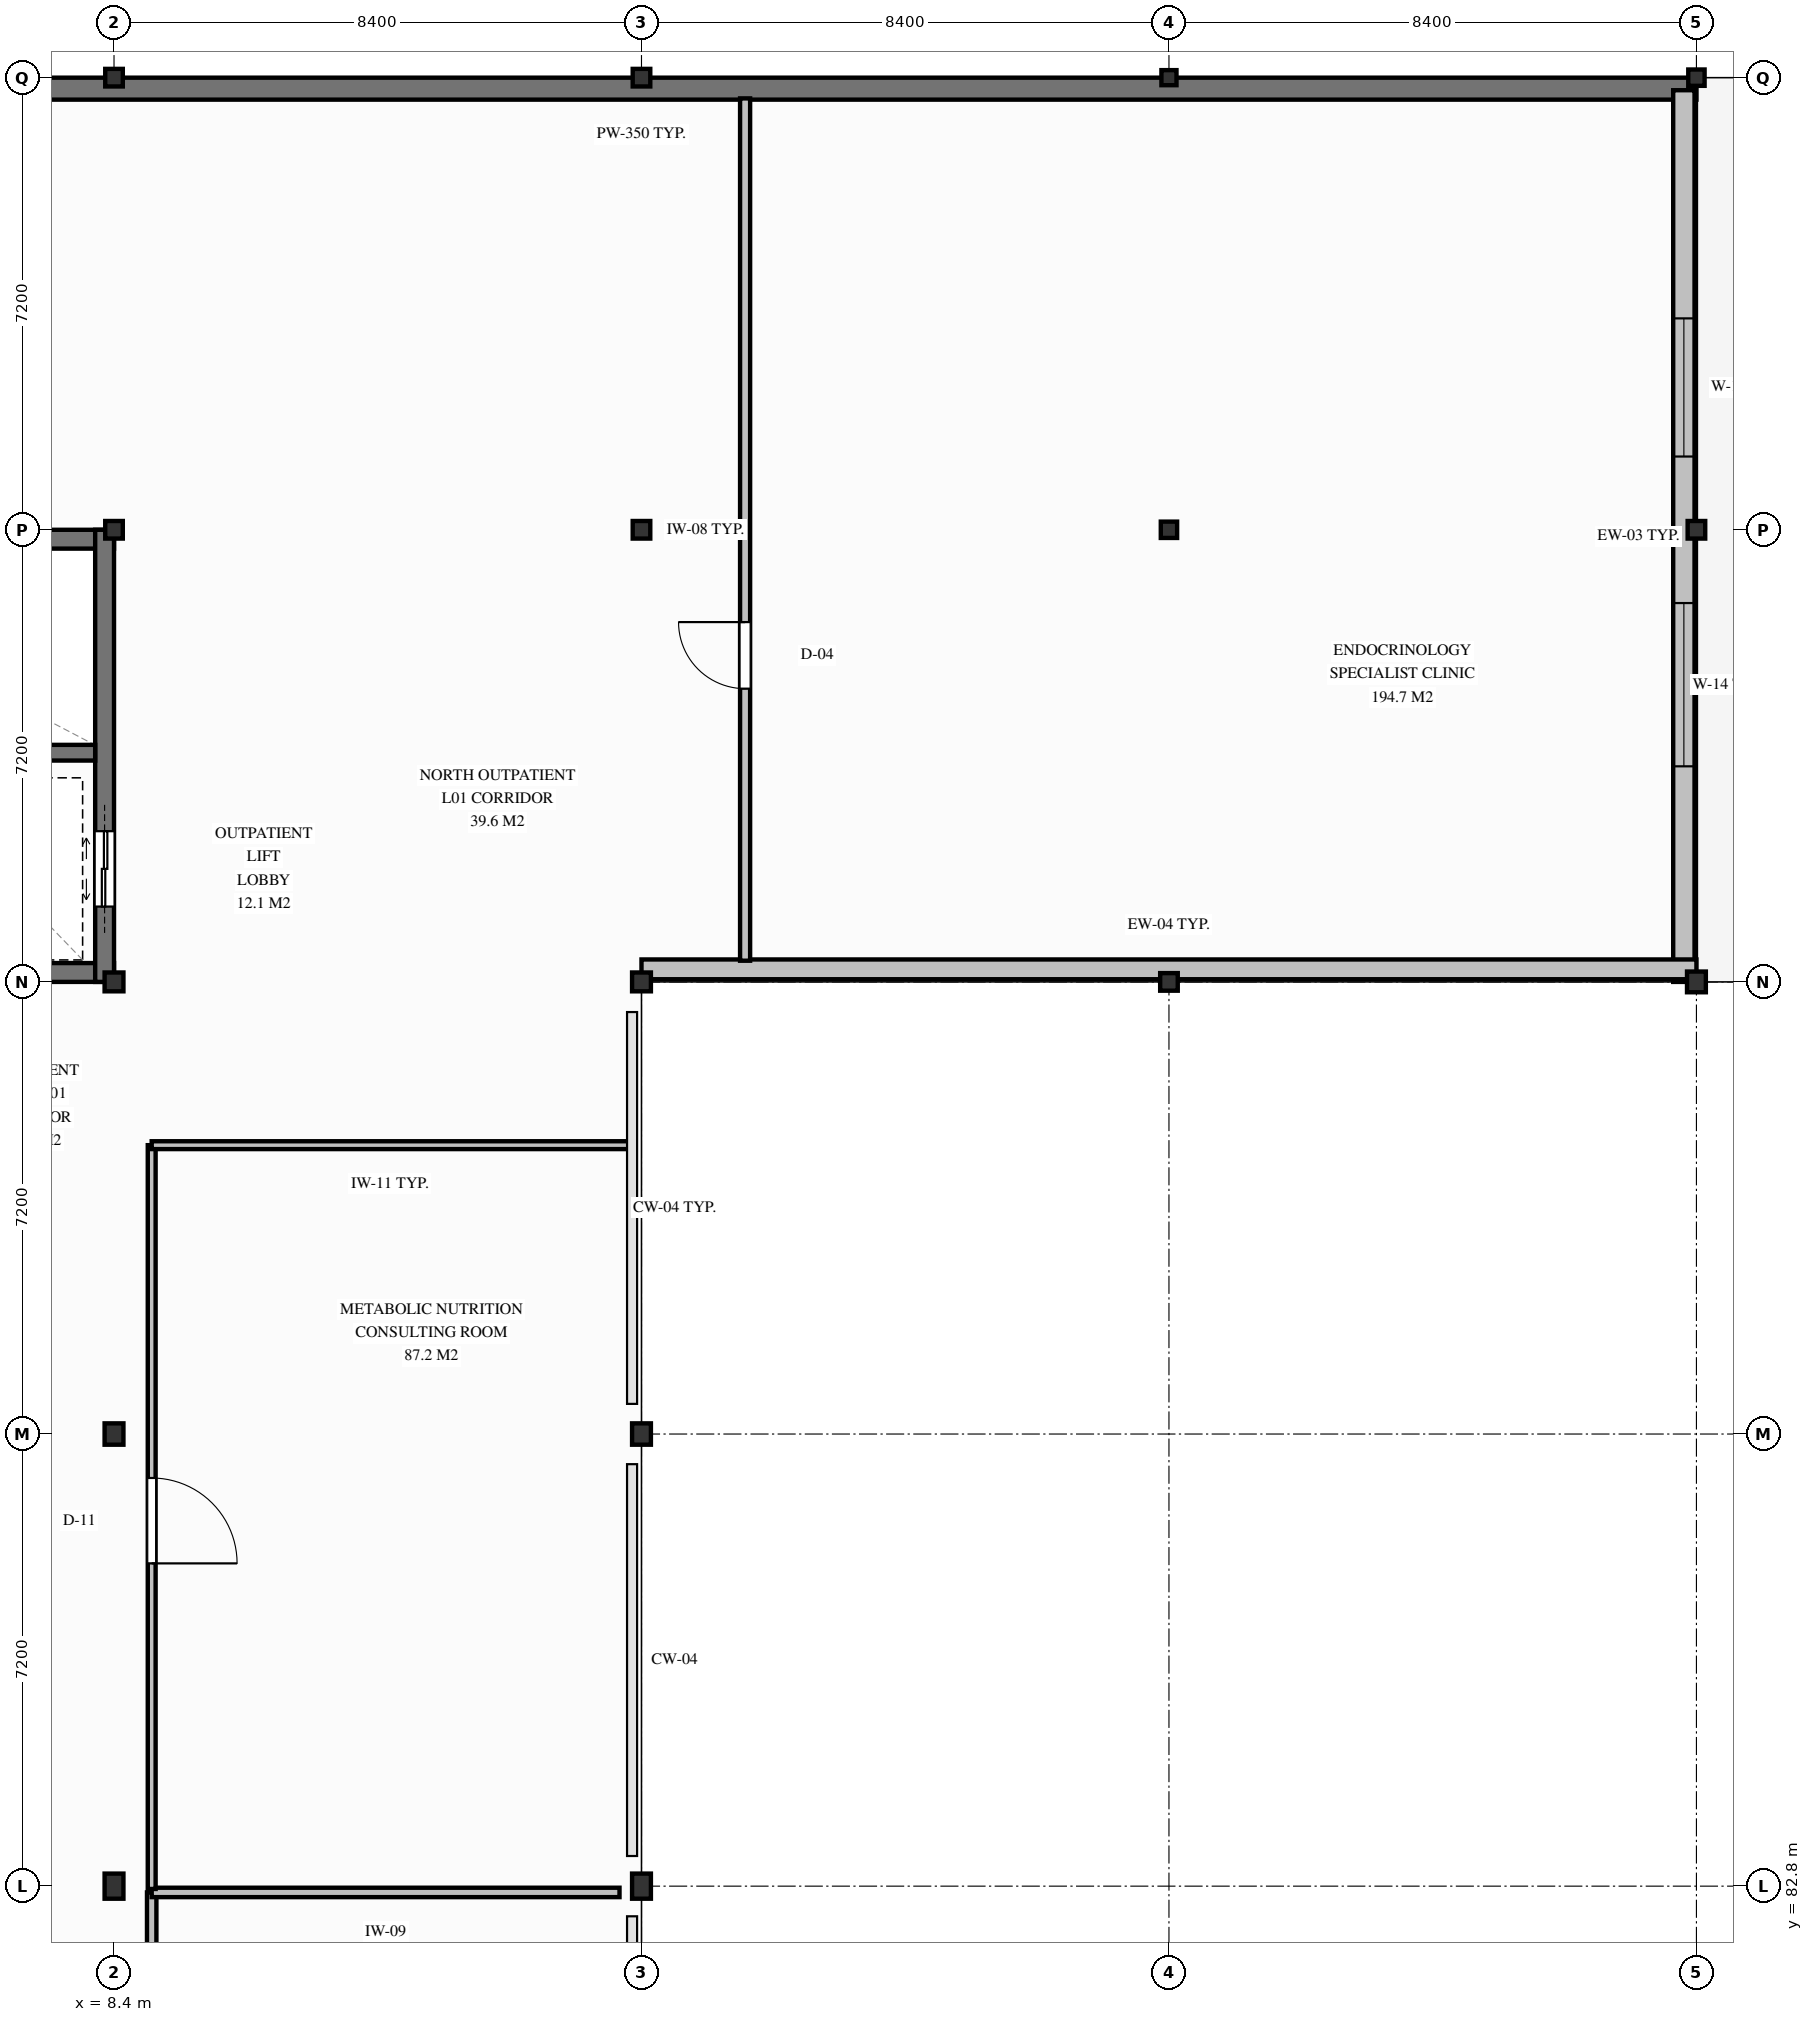
"""IFC4 building model, lengths in metres.
Left out: names, types, materials, properties, quantities, classifications, styles, units other than length and angle.
Written with IfcOpenShell. Run it as: python <this file> out.ifc"""

import sys

from ifc_helpers import new_model, si_unit, direction, frame, frame_2d, origin, origin_2d, place, context, subcontext, project, spatial, rectangle, i_section, extrude, element, fill, save


model = new_model("IFC4")
c1 = context("Model", 3, precision=1e-05, world=origin(), true_north=direction((0.0, 1.0)))
c2 = subcontext(c1, "Body", "Model", "MODEL_VIEW")
j1 = project(units=[si_unit("LENGTHUNIT", "METRE"), si_unit("PLANEANGLEUNIT", "RADIAN")], contexts=[c1])
p1 = place(None, origin())
s1 = spatial("IfcSite", under=j1, at=p1, CompositionType="ELEMENT")
p2 = place(p1, origin())
s2 = spatial("IfcBuilding", under=s1, at=p2, CompositionType="ELEMENT")
p3 = place(p2, frame((0.0, 0.0, 4.5)))
s3 = spatial("IfcBuildingStorey", under=s2, at=p3, CompositionType="ELEMENT", Elevation=4.5)
p4 = place(p3, frame((0.0, 104.25, 0.0), z_axis=(0.0, 0.0, 1.0), x_axis=(1.0, 0.0, 0.0)))
e1 = element("IfcWall", 1, at=p4, inside=s3, PredefinedType="SHEAR", context=c2, shape_type="SweptSolid", body=[
    extrude(rectangle(XDim=8.4, YDim=0.3, at=frame_2d((4.2, 0.0))), origin(), (0.0, 0.0, 1.0), 4.5),
])
p5 = place(p3, frame((0.0, 97.35, 0.0), z_axis=(0.0, 0.0, 1.0), x_axis=(1.0, 0.0, 0.0)))
e2 = element("IfcWall", 2, at=p5, inside=s3, PredefinedType="SHEAR", context=c2, shape_type="SweptSolid", body=[
    extrude(rectangle(XDim=8.4, YDim=0.3, at=frame_2d((4.2, 0.0))), origin(), (0.0, 0.0, 1.0), 4.5),
])
p6 = place(p5, frame((3.0, 0.0, 0.0)))
e3 = element("IfcOpeningElement", 3, at=p6, cuts=e2, PredefinedType="OPENING", context=c2, shape_type="SweptSolid", body=[
    extrude(rectangle(XDim=1.1, YDim=2.15, at=frame_2d((0.55, 1.075))), frame((0.0, 0.16, 0.0), z_axis=(0.0, -1.0, 0.0), x_axis=(1.0, 0.0, 0.0)), (0.0, 0.0, 1.0), 0.32),
])
p7 = place(p3, frame((8.25, 97.2, 0.0), z_axis=(0.0, 0.0, 1.0), x_axis=(0.0, 1.0, 0.0)))
e4 = element("IfcWall", 4, at=p7, inside=s3, PredefinedType="SHEAR", context=c2, shape_type="SweptSolid", body=[
    extrude(rectangle(XDim=7.2, YDim=0.3, at=frame_2d((3.6, 0.0))), origin(), (0.0, 0.0, 1.0), 4.5),
])
p8 = place(p7, frame((1.2, 0.0, 0.0)))
e5 = element("IfcOpeningElement", 5, at=p8, cuts=e4, PredefinedType="OPENING", context=c2, shape_type="SweptSolid", body=[
    extrude(rectangle(XDim=1.2, YDim=2.15, at=frame_2d((0.6, 1.075))), frame((0.0, 0.16, 0.0), z_axis=(0.0, -1.0, 0.0), x_axis=(1.0, 0.0, 0.0)), (0.0, 0.0, 1.0), 0.32),
])
p9 = place(p3, frame((0.3, 100.85, 0.0), z_axis=(0.0, 0.0, 1.0), x_axis=(1.0, 0.0, 0.0)))
e6 = element("IfcWall", 6, at=p9, inside=s3, PredefinedType="SHEAR", context=c2, shape_type="SweptSolid", body=[
    extrude(rectangle(XDim=7.8, YDim=0.25, at=frame_2d((3.9, 0.0))), origin(), (0.0, 0.0, 1.0), 4.5),
])
p10 = place(p9, frame((0.4, 0.0, 0.0)))
e7 = element("IfcOpeningElement", 7, at=p10, cuts=e6, PredefinedType="OPENING", context=c2, shape_type="SweptSolid", body=[
    extrude(rectangle(XDim=1.1, YDim=2.15, at=frame_2d((0.55, 1.075))), frame((0.0, 0.135, 0.0), z_axis=(0.0, -1.0, 0.0), x_axis=(1.0, 0.0, 0.0)), (0.0, 0.0, 1.0), 0.27),
])
p11 = place(p3, frame((0.0, 111.425, 0.0), z_axis=(0.0, 0.0, 1.0), x_axis=(1.0, 0.0, 0.0)))
e8 = element("IfcWall", 8, at=p11, inside=s3, PredefinedType="SHEAR", context=c2, shape_type="SweptSolid", body=[
    extrude(rectangle(XDim=33.6, YDim=0.35, at=frame_2d((16.8, 0.0))), origin(), (0.0, 0.0, 1.0), 4.5),
])
p12 = place(p3, frame((8.4, 82.8, 0.0), z_axis=(0.0, 0.0, 1.0), x_axis=(1.0, 0.0, 0.0)))
e9 = element("IfcColumn", 9, at=p12, inside=s3, PredefinedType="COLUMN", context=c2, shape_type="SweptSolid", body=[
    extrude(i_section(OverallWidth=0.3, OverallDepth=0.4, WebThickness=0.013, FlangeThickness=0.024, FilletRadius=0.027, at=origin_2d()), origin(), (0.0, 0.0, 1.0), 4.5),
])
p13 = place(p3, frame((8.4, 90.0, 0.0), z_axis=(0.0, 0.0, 1.0), x_axis=(1.0, 0.0, 0.0)))
e10 = element("IfcColumn", 10, at=p13, inside=s3, PredefinedType="COLUMN", context=c2, shape_type="SweptSolid", body=[
    extrude(i_section(OverallWidth=0.3, OverallDepth=0.34, WebThickness=0.012, FlangeThickness=0.021, FilletRadius=0.027, at=origin_2d()), origin(), (0.0, 0.0, 1.0), 4.5),
])
p14 = place(p3, frame((8.4, 97.2, 0.0), z_axis=(0.0, 0.0, 1.0), x_axis=(1.0, 0.0, 0.0)))
e11 = element("IfcColumn", 11, at=p14, inside=s3, PredefinedType="COLUMN", context=c2, shape_type="SweptSolid", body=[
    extrude(i_section(OverallWidth=0.3, OverallDepth=0.3, WebThickness=0.011, FlangeThickness=0.019, FilletRadius=0.027, at=origin_2d()), origin(), (0.0, 0.0, 1.0), 4.5),
])
for number, where, z_axis, x_axis in (
    (12, (8.4, 104.4, 0.0), (0.0, 0.0, 1.0), (1.0, 0.0, 0.0)),
    (13, (8.4, 111.6, 0.0), (0.0, 0.0, 1.0), (1.0, 0.0, 0.0)),
):
    element("IfcColumn", number, at=place(p3, frame(where, z_axis=z_axis, x_axis=x_axis)), inside=s3, PredefinedType="COLUMN", context=c2, shape_type="SweptSolid", body=[
        extrude(i_section(OverallWidth=0.28, OverallDepth=0.28, WebThickness=0.01, FlangeThickness=0.018, FilletRadius=0.024, at=origin_2d()), origin(), (0.0, 0.0, 1.0), 4.5),
    ])
p15 = place(p3, frame((16.8, 82.8, 0.0), z_axis=(0.0, 0.0, 1.0), x_axis=(1.0, 0.0, 0.0)))
e14 = element("IfcColumn", 14, at=p15, inside=s3, PredefinedType="COLUMN", context=c2, shape_type="SweptSolid", body=[
    extrude(i_section(OverallWidth=0.3, OverallDepth=0.4, WebThickness=0.013, FlangeThickness=0.024, FilletRadius=0.027, at=origin_2d()), origin(), (0.0, 0.0, 1.0), 4.5),
])
p16 = place(p3, frame((16.8, 90.0, 0.0), z_axis=(0.0, 0.0, 1.0), x_axis=(1.0, 0.0, 0.0)))
e15 = element("IfcColumn", 15, at=p16, inside=s3, PredefinedType="COLUMN", context=c2, shape_type="SweptSolid", body=[
    extrude(i_section(OverallWidth=0.3, OverallDepth=0.34, WebThickness=0.012, FlangeThickness=0.021, FilletRadius=0.027, at=origin_2d()), origin(), (0.0, 0.0, 1.0), 4.5),
])
p17 = place(p3, frame((16.8, 97.2, 0.0), z_axis=(0.0, 0.0, 1.0), x_axis=(1.0, 0.0, 0.0)))
e16 = element("IfcColumn", 16, at=p17, inside=s3, PredefinedType="COLUMN", context=c2, shape_type="SweptSolid", body=[
    extrude(i_section(OverallWidth=0.3, OverallDepth=0.3, WebThickness=0.011, FlangeThickness=0.019, FilletRadius=0.027, at=origin_2d()), origin(), (0.0, 0.0, 1.0), 4.5),
])
for number, where, z_axis, x_axis in (
    (17, (16.8, 104.4, 0.0), (0.0, 0.0, 1.0), (1.0, 0.0, 0.0)),
    (18, (16.8, 111.6, 0.0), (0.0, 0.0, 1.0), (1.0, 0.0, 0.0)),
    (19, (25.2, 97.2, 0.0), (0.0, 0.0, 1.0), (1.0, 0.0, 0.0)),
):
    element("IfcColumn", number, at=place(p3, frame(where, z_axis=z_axis, x_axis=x_axis)), inside=s3, PredefinedType="COLUMN", context=c2, shape_type="SweptSolid", body=[
        extrude(i_section(OverallWidth=0.28, OverallDepth=0.28, WebThickness=0.01, FlangeThickness=0.018, FilletRadius=0.024, at=origin_2d()), origin(), (0.0, 0.0, 1.0), 4.5),
    ])
p18 = place(p3, frame((25.2, 104.4, 0.0), z_axis=(0.0, 0.0, 1.0), x_axis=(1.0, 0.0, 0.0)))
e20 = element("IfcColumn", 20, at=p18, inside=s3, PredefinedType="COLUMN", context=c2, shape_type="SweptSolid", body=[
    extrude(i_section(OverallWidth=0.26, OverallDepth=0.26, WebThickness=0.01, FlangeThickness=0.018, FilletRadius=0.024, at=origin_2d()), origin(), (0.0, 0.0, 1.0), 4.5),
])
p19 = place(p3, frame((25.2, 111.6, 0.0), z_axis=(0.0, 0.0, 1.0), x_axis=(1.0, 0.0, 0.0)))
e21 = element("IfcColumn", 21, at=p19, inside=s3, PredefinedType="COLUMN", context=c2, shape_type="SweptSolid", body=[
    extrude(i_section(OverallWidth=0.24, OverallDepth=0.24, WebThickness=0.01, FlangeThickness=0.017, FilletRadius=0.021, at=origin_2d()), origin(), (0.0, 0.0, 1.0), 4.5),
])
p20 = place(p3, frame((33.6, 97.2, 0.0), z_axis=(0.0, 0.0, 1.0), x_axis=(1.0, 0.0, 0.0)))
e22 = element("IfcColumn", 22, at=p20, inside=s3, PredefinedType="COLUMN", context=c2, shape_type="SweptSolid", body=[
    extrude(i_section(OverallWidth=0.3, OverallDepth=0.33, WebThickness=0.01, FlangeThickness=0.017, FilletRadius=0.027, at=origin_2d()), origin(), (0.0, 0.0, 1.0), 4.5),
])
p21 = place(p3, frame((33.6, 104.4, 0.0), z_axis=(0.0, 0.0, 1.0), x_axis=(1.0, 0.0, 0.0)))
e23 = element("IfcColumn", 23, at=p21, inside=s3, PredefinedType="COLUMN", context=c2, shape_type="SweptSolid", body=[
    extrude(i_section(OverallWidth=0.28, OverallDepth=0.28, WebThickness=0.01, FlangeThickness=0.018, FilletRadius=0.024, at=origin_2d()), origin(), (0.0, 0.0, 1.0), 4.5),
])
p22 = place(p3, frame((33.6, 111.6, 0.0), z_axis=(0.0, 0.0, 1.0), x_axis=(1.0, 0.0, 0.0)))
e24 = element("IfcColumn", 24, at=p22, inside=s3, PredefinedType="COLUMN", context=c2, shape_type="SweptSolid", body=[
    extrude(i_section(OverallWidth=0.26, OverallDepth=0.26, WebThickness=0.01, FlangeThickness=0.018, FilletRadius=0.024, at=origin_2d()), origin(), (0.0, 0.0, 1.0), 4.5),
])
p23 = place(p3, frame((33.4, 111.4, 0.0), z_axis=(0.0, 0.0, 1.0), x_axis=(0.0, -1.0, 0.0)))
e25 = element("IfcWall", 25, at=p23, inside=s3, PredefinedType="SOLIDWALL", context=c2, shape_type="SweptSolid", body=[
    extrude(rectangle(XDim=14.2, YDim=0.34, at=frame_2d((7.1, 0.0))), origin(), (0.0, 0.0, 1.0), 3.678),
])
p24 = place(p23, frame((3.633, 0.0, 0.85)))
e26 = element("IfcOpeningElement", 26, at=p24, cuts=e25, PredefinedType="OPENING", context=c2, shape_type="SweptSolid", body=[
    extrude(rectangle(XDim=2.2, YDim=1.85, at=frame_2d((1.1, 0.925))), frame((0.0, 0.18, 0.0), z_axis=(0.0, -1.0, 0.0), x_axis=(1.0, 0.0, 0.0)), (0.0, 0.0, 1.0), 0.36),
])
p25 = place(p23, frame((8.167, 0.0, 0.85)))
e27 = element("IfcOpeningElement", 27, at=p25, cuts=e25, PredefinedType="OPENING", context=c2, shape_type="SweptSolid", body=[
    extrude(rectangle(XDim=2.6, YDim=2.1, at=frame_2d((1.3, 1.05))), frame((0.0, 0.18, 0.0), z_axis=(0.0, -1.0, 0.0), x_axis=(1.0, 0.0, 0.0)), (0.0, 0.0, 1.0), 0.36),
])
p26 = place(p3, frame((33.6, 97.4, 0.0), z_axis=(0.0, 0.0, 1.0), x_axis=(-1.0, 0.0, 0.0)))
e28 = element("IfcWall", 28, at=p26, inside=s3, PredefinedType="SOLIDWALL", context=c2, shape_type="SweptSolid", body=[
    extrude(rectangle(XDim=16.8, YDim=0.315, at=frame_2d((8.4, 0.0))), origin(), (0.0, 0.0, 1.0), 3.628),
])
p27 = place(p3, frame((18.45, 97.538, 0.0), z_axis=(0.0, 0.0, 1.0), x_axis=(0.0, 1.0, 0.0)))
e29 = element("IfcWall", 29, at=p27, inside=s3, PredefinedType="PARTITIONING", context=c2, shape_type="SweptSolid", body=[
    extrude(rectangle(XDim=13.732, YDim=0.16, at=frame_2d((6.866, 0.0))), origin(), (0.0, 0.0, 1.0), 3.728),
])
p28 = place(p27, frame((4.333, 0.0, 0.0)))
e30 = element("IfcOpeningElement", 30, at=p28, cuts=e29, PredefinedType="OPENING", context=c2, shape_type="SweptSolid", body=[
    extrude(rectangle(XDim=1.06, YDim=2.16, at=frame_2d((0.53, 1.08))), frame((0.0, 0.09, 0.0), z_axis=(0.0, -1.0, 0.0), x_axis=(1.0, 0.0, 0.0)), (0.0, 0.0, 1.0), 0.18),
])
p29 = place(p3, frame((9.0, 82.7, 0.0), z_axis=(0.0, 0.0, 1.0), x_axis=(0.0, -1.0, 0.0)))
e31 = element("IfcWall", 31, at=p29, inside=s3, PredefinedType="PARTITIONING", context=c2, shape_type="SweptSolid", body=[
    extrude(rectangle(XDim=16.462, YDim=0.15, at=frame_2d((8.231, 0.0))), origin(), (0.0, 0.0, 1.0), 3.828),
])
p30 = place(p29, frame((8.4, 0.0, 0.0)))
e32 = element("IfcOpeningElement", 32, at=p30, cuts=e31, PredefinedType="OPENING", context=c2, shape_type="SweptSolid", body=[
    extrude(rectangle(XDim=1.12, YDim=2.18, at=frame_2d((0.56, 1.09))), frame((0.0, 0.085, 0.0), z_axis=(0.0, -1.0, 0.0), x_axis=(1.0, 0.0, 0.0)), (0.0, 0.0, 1.0), 0.17),
])
p31 = place(p3, frame((16.45, 82.7, 0.0), z_axis=(0.0, 0.0, 1.0), x_axis=(-1.0, 0.0, 0.0)))
e33 = element("IfcWall", 33, at=p31, inside=s3, PredefinedType="PARTITIONING", context=c2, shape_type="SweptSolid", body=[
    extrude(rectangle(XDim=7.45, YDim=0.15, at=frame_2d((3.725, 0.0))), origin(), (0.0, 0.0, 1.0), 3.838),
])
p32 = place(p3, frame((9.0, 94.6, 0.0), z_axis=(0.0, 0.0, 1.0), x_axis=(0.0, -1.0, 0.0)))
e34 = element("IfcWall", 34, at=p32, inside=s3, PredefinedType="PARTITIONING", context=c2, shape_type="SweptSolid", body=[
    extrude(rectangle(XDim=11.845, YDim=0.125, at=frame_2d((5.923, 0.0))), origin(), (0.0, 0.0, 1.0), 3.838),
])
p33 = place(p32, frame((5.3, 0.0, 0.0)))
e35 = element("IfcOpeningElement", 35, at=p33, cuts=e34, PredefinedType="OPENING", context=c2, shape_type="SweptSolid", body=[
    extrude(rectangle(XDim=1.36, YDim=2.2, at=frame_2d((0.68, 1.1))), frame((0.0, 0.073, 0.0), z_axis=(0.0, -1.0, 0.0), x_axis=(1.0, 0.0, 0.0)), (0.0, 0.0, 1.0), 0.145),
])
p34 = place(p3, frame((16.59, 94.6, 0.0), z_axis=(0.0, 0.0, 1.0), x_axis=(-1.0, 0.0, 0.0)))
e36 = element("IfcWall", 36, at=p34, inside=s3, PredefinedType="PARTITIONING", context=c2, shape_type="SweptSolid", body=[
    extrude(rectangle(XDim=7.59, YDim=0.125, at=frame_2d((3.795, 0.0))), origin(), (0.0, 0.0, 1.0), 3.678),
])
p35 = place(p24, origin())
e37 = element("IfcWindow", 37, at=p35, inside=s3, PartitioningType="SINGLE_PANEL", PredefinedType="WINDOW", context=c2, shape_type="SweptSolid", body=[
    extrude(rectangle(XDim=2.2, YDim=1.85, at=frame_2d((1.1, 0.925))), frame((0.0, 0.03, 0.0), z_axis=(0.0, -1.0, 0.0), x_axis=(1.0, 0.0, 0.0)), (0.0, 0.0, 1.0), 0.06),
])
fill(e26, e37)
p36 = place(p25, origin())
e38 = element("IfcWindow", 38, at=p36, inside=s3, PartitioningType="SINGLE_PANEL", PredefinedType="WINDOW", context=c2, shape_type="SweptSolid", body=[
    extrude(rectangle(XDim=2.6, YDim=2.1, at=frame_2d((1.3, 1.05))), frame((0.0, 0.03, 0.0), z_axis=(0.0, -1.0, 0.0), x_axis=(1.0, 0.0, 0.0)), (0.0, 0.0, 1.0), 0.06),
])
fill(e27, e38)
p37 = place(p8, origin())
e39 = element("IfcDoor", 39, at=p37, inside=s3, OperationType="DOUBLE_DOOR_SLIDING", PredefinedType="DOOR", context=c2, shape_type="SweptSolid", body=[
    extrude(rectangle(XDim=1.2, YDim=2.15, at=frame_2d((0.6, 1.075))), frame((0.0, 0.025, 0.0), z_axis=(0.0, -1.0, 0.0), x_axis=(1.0, 0.0, 0.0)), (0.0, 0.0, 1.0), 0.05),
])
fill(e5, e39)
p38 = place(p28, origin())
e40 = element("IfcDoor", 40, at=p38, inside=s3, OperationType="SINGLE_SWING_RIGHT", PredefinedType="DOOR", context=c2, shape_type="SweptSolid", body=[
    extrude(rectangle(XDim=1.06, YDim=2.16, at=frame_2d((0.53, 1.08))), frame((0.0, 0.025, 0.0), z_axis=(0.0, -1.0, 0.0), x_axis=(1.0, 0.0, 0.0)), (0.0, 0.0, 1.0), 0.05),
])
fill(e30, e40)
p39 = place(p33, origin())
e41 = element("IfcDoor", 41, at=p39, inside=s3, OperationType="SINGLE_SWING_RIGHT", PredefinedType="DOOR", context=c2, shape_type="SweptSolid", body=[
    extrude(rectangle(XDim=1.36, YDim=2.2, at=frame_2d((0.68, 1.1))), frame((0.0, 0.025, 0.0), z_axis=(0.0, -1.0, 0.0), x_axis=(1.0, 0.0, 0.0)), (0.0, 0.0, 1.0), 0.05),
])
fill(e35, e41)
save(model, sys.argv[1])
